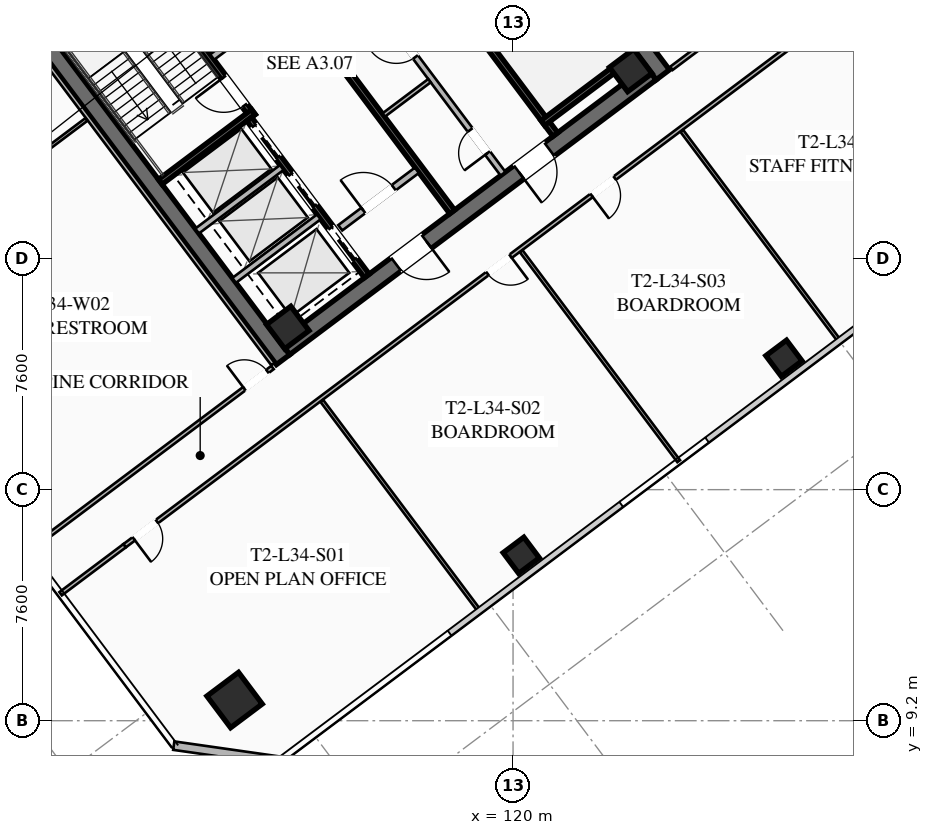
"""IFC4 building model, lengths in metres.
Left out: names, types, materials, properties, quantities, classifications, styles, units other than length and angle.
Written with IfcOpenShell. Run it as: python <this file> out.ifc"""

import sys

from ifc_helpers import new_model, si_unit, direction, frame, frame_2d, origin, origin_2d, place, context, subcontext, project, spatial, rectangle, hollow_rectangle, extrude, element, fill, save


model = new_model("IFC4")
c1 = context("Model", 3, precision=1e-05, world=origin(), true_north=direction((0.0, 1.0)))
c2 = subcontext(c1, "Body", "Model", "MODEL_VIEW")
j1 = project(units=[si_unit("LENGTHUNIT", "METRE"), si_unit("PLANEANGLEUNIT", "RADIAN")], contexts=[c1])
p1 = place(None, origin())
s1 = spatial("IfcSite", under=j1, at=p1, CompositionType="ELEMENT")
p2 = place(p1, origin())
s2 = spatial("IfcBuilding", under=s1, at=p2, CompositionType="ELEMENT")
p3 = place(p2, frame((0.0, 0.0, 128.6)))
s3 = spatial("IfcBuildingStorey", under=s2, at=p3, CompositionType="ELEMENT", Elevation=128.6)
for number, where, z_axis, x_axis in (
    (1, (112.436, 21.077, 0.0), (0.0, 0.0, 1.0), (-0.6, 0.8, 0.0)),
    (2, (115.564, 42.923, 0.0), (0.0, 0.0, 1.0), (0.6, -0.8, 0.0)),
):
    element("IfcWall", number, at=place(p3, frame(where, z_axis=z_axis, x_axis=x_axis)), inside=s3, PredefinedType="SHEAR", context=c2, shape_type="SweptSolid", body=[
        extrude(rectangle(XDim=15.6, YDim=0.55, at=frame_2d((7.8, 0.0))), origin(), (0.0, 0.0, 1.0), 3.55),
    ])
p4 = place(p3, frame((124.539, 30.498, 0.0), z_axis=(0.0, 0.0, 1.0), x_axis=(-0.799998054672, -0.600002593761, 0.0)))
e3 = element("IfcWall", 3, at=p4, inside=s3, PredefinedType="SHEAR", context=c2, shape_type="SweptSolid", body=[
    extrude(rectangle(XDim=15.06, YDim=0.55, at=frame_2d((7.53, 0.0))), origin(), (0.0, 0.0, 1.0), 3.55),
])
p5 = place(p4, frame((9.23, 0.0, 0.0)))
e4 = element("IfcOpeningElement", 4, at=p5, cuts=e3, PredefinedType="OPENING", context=c2, shape_type="SweptSolid", body=[
    extrude(rectangle(XDim=1.25, YDim=2.25, at=frame_2d((0.625, 1.125))), frame((0.0, 0.285, 0.0), z_axis=(0.0, -1.0, 0.0), x_axis=(1.0, 0.0, 0.0)), (0.0, 0.0, 1.0), 0.57),
])
p6 = place(p4, frame((4.18, 0.0, 0.0)))
e5 = element("IfcOpeningElement", 5, at=p6, cuts=e3, PredefinedType="OPENING", context=c2, shape_type="SweptSolid", body=[
    extrude(rectangle(XDim=1.25, YDim=2.25, at=frame_2d((0.625, 1.125))), frame((0.0, 0.285, 0.0), z_axis=(0.0, -1.0, 0.0), x_axis=(1.0, 0.0, 0.0)), (0.0, 0.0, 1.0), 0.57),
])
for number, where, z_axis, x_axis in (
    (6, (112.59, 22.13, 0.0), (0.0, 0.0, 1.0), (0.8, 0.6, 0.0)),
    (7, (123.87, 30.59, 0.0), (0.0, 0.0, 1.0), (0.8, 0.6, 0.0)),
):
    element("IfcColumn", number, at=place(p3, frame(where, z_axis=z_axis, x_axis=x_axis)), inside=s3, PredefinedType="COLUMN", context=c2, shape_type="SweptSolid", body=[
        extrude(hollow_rectangle(XDim=1.0, YDim=1.0, WallThickness=0.04, at=origin_2d()), origin(), (0.0, 0.0, 1.0), 3.37),
    ])
p7 = place(p3, frame((110.84, 9.88, 0.0), z_axis=(0.0, 0.0, 1.0), x_axis=(0.799999996291, 0.600000004945, 0.0)))
e8 = element("IfcColumn", 8, at=p7, inside=s3, PredefinedType="COLUMN", context=c2, shape_type="SweptSolid", body=[
    extrude(hollow_rectangle(XDim=1.3, YDim=1.3, WallThickness=0.05, at=origin_2d()), origin(), (0.0, 0.0, 1.0), 3.37),
])
for number, where, z_axis, x_axis in (
    (9, (120.27, 14.64, 0.0), (0.0, 0.0, 1.0), (0.8, 0.6, 0.0)),
    (10, (128.91, 21.12, 0.0), (0.0, 0.0, 1.0), (0.8, 0.6, 0.0)),
):
    element("IfcColumn", number, at=place(p3, frame(where, z_axis=z_axis, x_axis=x_axis)), inside=s3, PredefinedType="COLUMN", context=c2, shape_type="SweptSolid", body=[
        extrude(hollow_rectangle(XDim=0.85, YDim=0.85, WallThickness=0.035, at=origin_2d()), origin(), (0.0, 0.0, 1.0), 3.37),
    ])
p8 = place(p3, frame((112.34, 7.88, 0.0), z_axis=(0.0, 0.0, 1.0), x_axis=(-0.989949493661, 0.141421356237, 0.0)))
e11 = element("IfcWall", 11, at=p8, inside=s3, PredefinedType="SOLIDWALL", context=c2, shape_type="SweptSolid", body=[
    extrude(rectangle(XDim=3.536, YDim=0.28, at=frame_2d((1.768, 0.0))), origin(), (0.0, 0.0, 1.0), 3.37),
])
p9 = place(p3, frame((111.44, 29.08, 0.0), z_axis=(0.0, 0.0, 1.0), x_axis=(-0.59999029481, 0.8000072788, 0.0)))
e12 = element("IfcWall", 12, at=p9, inside=s3, PredefinedType="SHEAR", context=c2, shape_type="SweptSolid", body=[
    extrude(rectangle(XDim=8.05, YDim=0.2, at=frame_2d((4.025, 0.0))), origin(), (0.0, 0.0, 1.0), 3.37),
])
p10 = place(p9, frame((0.45, 0.0, 0.0)))
e13 = element("IfcOpeningElement", 13, at=p10, cuts=e12, PredefinedType="OPENING", context=c2, shape_type="SweptSolid", body=[
    extrude(rectangle(XDim=1.15, YDim=2.2, at=frame_2d((0.575, 1.1))), frame((0.0, 0.11, 0.0), z_axis=(0.0, -1.0, 0.0), x_axis=(1.0, 0.0, 0.0)), (0.0, 0.0, 1.0), 0.22),
])
p11 = place(p3, frame((108.396, 26.922, 0.0), z_axis=(0.0, 0.0, 1.0), x_axis=(0.800015298837, 0.599979601008, 0.0)))
e14 = element("IfcWall", 14, at=p11, inside=s3, PredefinedType="SHEAR", context=c2, shape_type="SweptSolid", body=[
    extrude(rectangle(XDim=3.83, YDim=0.2, at=frame_2d((1.915, 0.0))), origin(), (0.0, 0.0, 1.0), 3.37),
])
p12 = place(p3, frame((116.56, 34.92, 0.0), z_axis=(0.0, 0.0, 1.0), x_axis=(0.59999029481, -0.8000072788, 0.0)))
e15 = element("IfcWall", 15, at=p12, inside=s3, PredefinedType="SHEAR", context=c2, shape_type="SweptSolid", body=[
    extrude(rectangle(XDim=8.05, YDim=0.2, at=frame_2d((4.025, 0.0))), origin(), (0.0, 0.0, 1.0), 3.37),
])
p13 = place(p12, frame((0.45, 0.0, 0.0)))
e16 = element("IfcOpeningElement", 16, at=p13, cuts=e15, PredefinedType="OPENING", context=c2, shape_type="SweptSolid", body=[
    extrude(rectangle(XDim=1.15, YDim=2.2, at=frame_2d((0.575, 1.1))), frame((0.0, 0.11, 0.0), z_axis=(0.0, -1.0, 0.0), x_axis=(1.0, 0.0, 0.0)), (0.0, 0.0, 1.0), 0.22),
])
p14 = place(p3, frame((120.98, 28.86, 0.0), z_axis=(0.0, 0.0, 1.0), x_axis=(0.800015298837, 0.599979601008, 0.0)))
e17 = element("IfcWall", 17, at=p14, inside=s3, PredefinedType="SHEAR", context=c2, shape_type="SweptSolid", body=[
    extrude(rectangle(XDim=3.83, YDim=0.2, at=frame_2d((1.915, 0.0))), origin(), (0.0, 0.0, 1.0), 3.37),
])
p15 = place(p3, frame((117.998, 25.936, 0.0), z_axis=(0.0, 0.0, 1.0), x_axis=(-0.600002693989, 0.799997979501, 0.0)))
e18 = element("IfcWall", 18, at=p15, inside=s3, PredefinedType="SHEAR", context=c2, shape_type="SweptSolid", body=[
    extrude(rectangle(XDim=14.5, YDim=0.2, at=frame_2d((7.25, 0.0))), origin(), (0.0, 0.0, 1.0), 3.37),
])
p16 = place(p3, frame((110.104, 31.028, 0.0), z_axis=(0.0, 0.0, 1.0), x_axis=(0.800018601094, 0.59997519774, 0.0)))
e19 = element("IfcWall", 19, at=p16, inside=s3, PredefinedType="SOLIDWALL", context=c2, shape_type="SweptSolid", body=[
    extrude(rectangle(XDim=3.15, YDim=0.22, at=frame_2d((1.575, 0.0))), origin(), (0.0, 0.0, 1.0), 2.723),
])
p17 = place(p16, frame((1.1, 0.0, 0.0)))
e20 = element("IfcOpeningElement", 20, at=p17, cuts=e19, PredefinedType="OPENING", context=c2, shape_type="SweptSolid", body=[
    extrude(rectangle(XDim=0.95, YDim=2.05, at=frame_2d((0.475, 1.025))), frame((0.0, 0.12, 0.0), z_axis=(0.0, -1.0, 0.0), x_axis=(1.0, 0.0, 0.0)), (0.0, 0.0, 1.0), 0.24),
])
p18 = place(p3, frame((114.316, 25.412, 0.0), z_axis=(0.0, 0.0, 1.0), x_axis=(0.800018601094, 0.59997519774, 0.0)))
e21 = element("IfcWall", 21, at=p18, inside=s3, PredefinedType="SOLIDWALL", context=c2, shape_type="SweptSolid", body=[
    extrude(rectangle(XDim=3.15, YDim=0.22, at=frame_2d((1.575, 0.0))), origin(), (0.0, 0.0, 1.0), 2.723),
])
p19 = place(p18, frame((0.95, 0.0, 0.0)))
e22 = element("IfcOpeningElement", 22, at=p19, cuts=e21, PredefinedType="OPENING", context=c2, shape_type="SweptSolid", body=[
    extrude(rectangle(XDim=1.25, YDim=2.25, at=frame_2d((0.625, 1.125))), frame((0.0, 0.12, 0.0), z_axis=(0.0, -1.0, 0.0), x_axis=(1.0, 0.0, 0.0)), (0.0, 0.0, 1.0), 0.24),
])
p20 = place(p3, frame((115.19, 23.83, 0.0), z_axis=(0.0, 0.0, 1.0), x_axis=(-0.599993943644, 0.800004542231, 0.0)))
e23 = element("IfcWall", 23, at=p20, inside=s3, PredefinedType="SHEAR", context=c2, shape_type="SweptSolid", body=[
    extrude(rectangle(XDim=6.45, YDim=0.2, at=frame_2d((3.225, 0.0))), origin(), (0.0, 0.0, 1.0), 3.37),
])
p21 = place(p20, frame((4.875, 0.0, 0.0)))
e24 = element("IfcOpeningElement", 24, at=p21, cuts=e23, PredefinedType="OPENING", context=c2, shape_type="SweptSolid", body=[
    extrude(rectangle(XDim=1.3, YDim=2.25, at=frame_2d((0.65, 1.125))), frame((0.0, 0.11, 0.0), z_axis=(0.0, -1.0, 0.0), x_axis=(1.0, 0.0, 0.0)), (0.0, 0.0, 1.0), 0.22),
])
p22 = place(p20, frame((2.875, 0.0, 0.0)))
e25 = element("IfcOpeningElement", 25, at=p22, cuts=e23, PredefinedType="OPENING", context=c2, shape_type="SweptSolid", body=[
    extrude(rectangle(XDim=1.3, YDim=2.25, at=frame_2d((0.65, 1.125))), frame((0.0, 0.11, 0.0), z_axis=(0.0, -1.0, 0.0), x_axis=(1.0, 0.0, 0.0)), (0.0, 0.0, 1.0), 0.22),
])
p23 = place(p20, frame((0.675, 0.0, 0.0)))
e26 = element("IfcOpeningElement", 26, at=p23, cuts=e23, PredefinedType="OPENING", context=c2, shape_type="SweptSolid", body=[
    extrude(rectangle(XDim=1.3, YDim=2.25, at=frame_2d((0.65, 1.125))), frame((0.0, 0.11, 0.0), z_axis=(0.0, -1.0, 0.0), x_axis=(1.0, 0.0, 0.0)), (0.0, 0.0, 1.0), 0.22),
])
for number, where, z_axis, x_axis in (
    (27, (110.826, 23.682, 0.0), (0.0, 0.0, 1.0), (0.8, 0.6, 0.0)),
    (28, (109.608, 25.306, 0.0), (0.0, 0.0, 1.0), (0.8, 0.6, 0.0)),
):
    element("IfcWall", number, at=place(p3, frame(where, z_axis=z_axis, x_axis=x_axis)), inside=s3, PredefinedType="SOLIDWALL", context=c2, shape_type="SweptSolid", body=[
        extrude(rectangle(XDim=3.48, YDim=0.2, at=frame_2d((1.74, 0.0))), origin(), (0.0, 0.0, 1.0), 3.37),
    ])
p24 = place(p3, frame((119.67, 27.19, 0.0), z_axis=(0.0, 0.0, 1.0), x_axis=(-0.599988677396, 0.800008491828, 0.0)))
e29 = element("IfcWall", 29, at=p24, inside=s3, PredefinedType="SOLIDWALL", context=c2, shape_type="SweptSolid", body=[
    extrude(rectangle(XDim=6.9, YDim=0.2, at=frame_2d((3.45, 0.0))), origin(), (0.0, 0.0, 1.0), 2.723),
])
p25 = place(p24, frame((0.85, 0.0, 0.0)))
e30 = element("IfcOpeningElement", 30, at=p25, cuts=e29, PredefinedType="OPENING", context=c2, shape_type="SweptSolid", body=[
    extrude(rectangle(XDim=0.95, YDim=2.05, at=frame_2d((0.475, 1.025))), frame((0.0, 0.11, 0.0), z_axis=(0.0, -1.0, 0.0), x_axis=(1.0, 0.0, 0.0)), (0.0, 0.0, 1.0), 0.22),
])
p26 = place(p24, frame((4.8, 0.0, 0.0)))
e31 = element("IfcOpeningElement", 31, at=p26, cuts=e29, PredefinedType="OPENING", context=c2, shape_type="SweptSolid", body=[
    extrude(rectangle(XDim=1.05, YDim=2.2, at=frame_2d((0.525, 1.1))), frame((0.0, 0.11, 0.0), z_axis=(0.0, -1.0, 0.0), x_axis=(1.0, 0.0, 0.0)), (0.0, 0.0, 1.0), 0.22),
])
p27 = place(p3, frame((115.746, 29.122, 0.0), z_axis=(0.0, 0.0, 1.0), x_axis=(0.8, 0.6, 0.0)))
e32 = element("IfcWall", 32, at=p27, inside=s3, PredefinedType="PARTITIONING", context=c2, shape_type="SweptSolid", body=[
    extrude(rectangle(XDim=1.88, YDim=0.135, at=frame_2d((0.94, 0.0))), origin(), (0.0, 0.0, 1.0), 2.723),
])
p28 = place(p3, frame((95.42, 30.69, 0.0), z_axis=(0.0, 0.0, 1.0), x_axis=(0.8, 0.6, 0.0)))
e33 = element("IfcWall", 33, at=p28, inside=s3, PredefinedType="PARTITIONING", context=c2, shape_type="SweptSolid", body=[
    extrude(rectangle(XDim=31.3, YDim=0.135, at=frame_2d((15.65, 0.0))), origin(), (0.0, 0.0, 1.0), 2.723),
])
p29 = place(p28, frame((0.3, 0.0, 0.0)))
e34 = element("IfcOpeningElement", 34, at=p29, cuts=e33, PredefinedType="OPENING", context=c2, shape_type="SweptSolid", body=[
    extrude(rectangle(XDim=0.95, YDim=2.05, at=frame_2d((0.475, 1.025))), frame((0.0, 0.077, 0.0), z_axis=(0.0, -1.0, 0.0), x_axis=(1.0, 0.0, 0.0)), (0.0, 0.0, 1.0), 0.155),
])
p30 = place(p28, frame((30.05, 0.0, 0.0)))
e35 = element("IfcOpeningElement", 35, at=p30, cuts=e33, PredefinedType="OPENING", context=c2, shape_type="SweptSolid", body=[
    extrude(rectangle(XDim=0.95, YDim=2.05, at=frame_2d((0.475, 1.025))), frame((0.0, 0.077, 0.0), z_axis=(0.0, -1.0, 0.0), x_axis=(1.0, 0.0, 0.0)), (0.0, 0.0, 1.0), 0.155),
])
p31 = place(p3, frame((132.262, 33.734, 0.0), z_axis=(0.0, 0.0, 1.0), x_axis=(-0.800003744006, -0.59999500796, 0.0)))
e36 = element("IfcWall", 36, at=p31, inside=s3, PredefinedType="PARTITIONING", context=c2, shape_type="SweptSolid", body=[
    extrude(rectangle(XDim=31.3, YDim=0.135, at=frame_2d((15.65, 0.0))), origin(), (0.0, 0.0, 1.0), 2.723),
])
p32 = place(p31, frame((29.97, 0.0, 0.0)))
e37 = element("IfcOpeningElement", 37, at=p32, cuts=e36, PredefinedType="OPENING", context=c2, shape_type="SweptSolid", body=[
    extrude(rectangle(XDim=0.95, YDim=2.05, at=frame_2d((0.475, 1.025))), frame((0.0, 0.077, 0.0), z_axis=(0.0, -1.0, 0.0), x_axis=(1.0, 0.0, 0.0)), (0.0, 0.0, 1.0), 0.155),
])
p33 = place(p31, frame((15.43, 0.0, 0.0)))
e38 = element("IfcOpeningElement", 38, at=p33, cuts=e36, PredefinedType="OPENING", context=c2, shape_type="SweptSolid", body=[
    extrude(rectangle(XDim=0.95, YDim=2.05, at=frame_2d((0.475, 1.025))), frame((0.0, 0.077, 0.0), z_axis=(0.0, -1.0, 0.0), x_axis=(1.0, 0.0, 0.0)), (0.0, 0.0, 1.0), 0.155),
])
p34 = place(p31, frame((11.146, 0.0, 0.0)))
e39 = element("IfcOpeningElement", 39, at=p34, cuts=e36, PredefinedType="OPENING", context=c2, shape_type="SweptSolid", body=[
    extrude(rectangle(XDim=0.95, YDim=2.05, at=frame_2d((0.475, 1.025))), frame((0.0, 0.077, 0.0), z_axis=(0.0, -1.0, 0.0), x_axis=(1.0, 0.0, 0.0)), (0.0, 0.0, 1.0), 0.155),
])
p35 = place(p31, frame((0.38, 0.0, 0.0)))
e40 = element("IfcOpeningElement", 40, at=p35, cuts=e36, PredefinedType="OPENING", context=c2, shape_type="SweptSolid", body=[
    extrude(rectangle(XDim=0.95, YDim=2.05, at=frame_2d((0.475, 1.025))), frame((0.0, 0.077, 0.0), z_axis=(0.0, -1.0, 0.0), x_axis=(1.0, 0.0, 0.0)), (0.0, 0.0, 1.0), 0.155),
])
p36 = place(p3, frame((105.118, 13.376, 0.0), z_axis=(0.0, 0.0, 1.0), x_axis=(0.799977721118, 0.600029704027, 0.0)))
e41 = element("IfcWall", 41, at=p36, inside=s3, PredefinedType="PARTITIONING", context=c2, shape_type="SweptSolid", body=[
    extrude(rectangle(XDim=2.63, YDim=0.135, at=frame_2d((1.315, 0.0))), origin(), (0.0, 0.0, 1.0), 2.723),
])
p37 = place(p3, frame((118.888, 12.816, 0.0), z_axis=(0.0, 0.0, 1.0), x_axis=(-0.599995473644, 0.800003394747, 0.0)))
e42 = element("IfcWall", 42, at=p37, inside=s3, PredefinedType="PARTITIONING", context=c2, shape_type="SweptSolid", body=[
    extrude(rectangle(XDim=8.63, YDim=0.11, at=frame_2d((4.315, 0.0))), origin(), (0.0, 0.0, 1.0), 2.723),
])
p38 = place(p3, frame((125.448, 17.736, 0.0), z_axis=(0.0, 0.0, 1.0), x_axis=(-0.600009052859, 0.799993210276, 0.0)))
e43 = element("IfcWall", 43, at=p38, inside=s3, PredefinedType="PARTITIONING", context=c2, shape_type="SweptSolid", body=[
    extrude(rectangle(XDim=8.63, YDim=0.11, at=frame_2d((4.315, 0.0))), origin(), (0.0, 0.0, 1.0), 2.723),
])
p39 = place(p3, frame((130.728, 21.696, 0.0), z_axis=(0.0, 0.0, 1.0), x_axis=(-0.599995473644, 0.800003394747, 0.0)))
e44 = element("IfcWall", 44, at=p39, inside=s3, PredefinedType="PARTITIONING", context=c2, shape_type="SweptSolid", body=[
    extrude(rectangle(XDim=8.63, YDim=0.11, at=frame_2d((4.315, 0.0))), origin(), (0.0, 0.0, 1.0), 2.723),
])
p40 = place(p3, frame((125.208, 30.656, 0.0), z_axis=(0.0, 0.0, 1.0), x_axis=(0.800005876956, 0.599992163979, 0.0)))
e45 = element("IfcWall", 45, at=p40, inside=s3, PredefinedType="PARTITIONING", context=c2, shape_type="SweptSolid", body=[
    extrude(rectangle(XDim=9.97, YDim=0.135, at=frame_2d((4.985, 0.0))), origin(), (0.0, 0.0, 1.0), 2.723),
])
p41 = place(p40, frame((2.045, 0.0, 0.0)))
e46 = element("IfcOpeningElement", 46, at=p41, cuts=e45, PredefinedType="OPENING", context=c2, shape_type="SweptSolid", body=[
    extrude(rectangle(XDim=0.95, YDim=2.05, at=frame_2d((0.475, 1.025))), frame((0.0, 0.077, 0.0), z_axis=(0.0, -1.0, 0.0), x_axis=(1.0, 0.0, 0.0)), (0.0, 0.0, 1.0), 0.155),
])
p42 = place(p3, frame((112.104, 20.928, 0.0), z_axis=(0.0, 0.0, 1.0), x_axis=(-0.599994940075, 0.800003794918, 0.0)))
e47 = element("IfcWall", 47, at=p42, inside=s3, PredefinedType="PARTITIONING", context=c2, shape_type="SweptSolid", body=[
    extrude(rectangle(XDim=15.44, YDim=0.135, at=frame_2d((7.72, 0.0))), origin(), (0.0, 0.0, 1.0), 2.723),
])
p43 = place(p3, frame((104.056, 14.792, 0.0), z_axis=(0.0, 0.0, 1.0), x_axis=(0.800002918023, 0.599996109283, 0.0)))
e48 = element("IfcWall", 48, at=p43, inside=s3, PredefinedType="PARTITIONING", context=c2, shape_type="SweptSolid", body=[
    extrude(rectangle(XDim=10.04, YDim=0.135, at=frame_2d((5.02, 0.0))), origin(), (0.0, 0.0, 1.0), 2.723),
])
p44 = place(p43, frame((8.88, 0.0, 0.0)))
e49 = element("IfcOpeningElement", 49, at=p44, cuts=e48, PredefinedType="OPENING", context=c2, shape_type="SweptSolid", body=[
    extrude(rectangle(XDim=0.95, YDim=2.05, at=frame_2d((0.475, 1.025))), frame((0.0, 0.077, 0.0), z_axis=(0.0, -1.0, 0.0), x_axis=(1.0, 0.0, 0.0)), (0.0, 0.0, 1.0), 0.155),
])
p45 = place(p3, frame((97.936, 22.952, 0.0), z_axis=(0.0, 0.0, 1.0), x_axis=(0.799991245945, 0.600011671896, 0.0)))
e50 = element("IfcWall", 50, at=p45, inside=s3, PredefinedType="PARTITIONING", context=c2, shape_type="SweptSolid", body=[
    extrude(rectangle(XDim=10.04, YDim=0.11, at=frame_2d((5.02, 0.0))), origin(), (0.0, 0.0, 1.0), 2.723),
])
p46 = place(p5, origin())
e51 = element("IfcDoor", 51, at=p46, inside=s3, OperationType="SINGLE_SWING_LEFT", PredefinedType="DOOR", context=c2, shape_type="SweptSolid", body=[
    extrude(rectangle(XDim=1.25, YDim=2.25, at=frame_2d((0.625, 1.125))), frame((0.0, 0.025, 0.0), z_axis=(0.0, -1.0, 0.0), x_axis=(1.0, 0.0, 0.0)), (0.0, 0.0, 1.0), 0.05),
])
fill(e4, e51)
p47 = place(p6, origin())
e52 = element("IfcDoor", 52, at=p47, inside=s3, OperationType="SINGLE_SWING_RIGHT", PredefinedType="DOOR", context=c2, shape_type="SweptSolid", body=[
    extrude(rectangle(XDim=1.25, YDim=2.25, at=frame_2d((0.625, 1.125))), frame((0.0, 0.025, 0.0), z_axis=(0.0, -1.0, 0.0), x_axis=(1.0, 0.0, 0.0)), (0.0, 0.0, 1.0), 0.05),
])
fill(e5, e52)
p48 = place(p10, origin())
e53 = element("IfcDoor", 53, at=p48, inside=s3, OperationType="SINGLE_SWING_RIGHT", PredefinedType="DOOR", context=c2, shape_type="SweptSolid", body=[
    extrude(rectangle(XDim=1.15, YDim=2.2, at=frame_2d((0.575, 1.1))), frame((0.0, 0.025, 0.0), z_axis=(0.0, -1.0, 0.0), x_axis=(1.0, 0.0, 0.0)), (0.0, 0.0, 1.0), 0.05),
])
fill(e13, e53)
p49 = place(p19, origin())
e54 = element("IfcDoor", 54, at=p49, inside=s3, OperationType="SINGLE_SWING_LEFT", PredefinedType="DOOR", context=c2, shape_type="SweptSolid", body=[
    extrude(rectangle(XDim=1.25, YDim=2.25, at=frame_2d((0.625, 1.125))), frame((0.0, 0.025, 0.0), z_axis=(0.0, -1.0, 0.0), x_axis=(1.0, 0.0, 0.0)), (0.0, 0.0, 1.0), 0.05),
])
fill(e22, e54)
p50 = place(p25, origin())
e55 = element("IfcDoor", 55, at=p50, inside=s3, OperationType="SINGLE_SWING_LEFT", PredefinedType="DOOR", context=c2, shape_type="SweptSolid", body=[
    extrude(rectangle(XDim=0.95, YDim=2.05, at=frame_2d((0.475, 1.025))), frame((0.0, 0.025, 0.0), z_axis=(0.0, -1.0, 0.0), x_axis=(1.0, 0.0, 0.0)), (0.0, 0.0, 1.0), 0.05),
])
fill(e30, e55)
p51 = place(p26, origin())
e56 = element("IfcDoor", 56, at=p51, inside=s3, OperationType="SINGLE_SWING_RIGHT", PredefinedType="DOOR", context=c2, shape_type="SweptSolid", body=[
    extrude(rectangle(XDim=1.05, YDim=2.2, at=frame_2d((0.525, 1.1))), frame((0.0, 0.025, 0.0), z_axis=(0.0, -1.0, 0.0), x_axis=(1.0, 0.0, 0.0)), (0.0, 0.0, 1.0), 0.05),
])
fill(e31, e56)
p52 = place(p32, origin())
e57 = element("IfcDoor", 57, at=p52, inside=s3, OperationType="SINGLE_SWING_RIGHT", PredefinedType="DOOR", context=c2, shape_type="SweptSolid", body=[
    extrude(rectangle(XDim=0.95, YDim=2.05, at=frame_2d((0.475, 1.025))), frame((0.0, 0.025, 0.0), z_axis=(0.0, -1.0, 0.0), x_axis=(1.0, 0.0, 0.0)), (0.0, 0.0, 1.0), 0.05),
])
fill(e37, e57)
p53 = place(p33, origin())
e58 = element("IfcDoor", 58, at=p53, inside=s3, OperationType="SINGLE_SWING_LEFT", PredefinedType="DOOR", context=c2, shape_type="SweptSolid", body=[
    extrude(rectangle(XDim=0.95, YDim=2.05, at=frame_2d((0.475, 1.025))), frame((0.0, 0.025, 0.0), z_axis=(0.0, -1.0, 0.0), x_axis=(1.0, 0.0, 0.0)), (0.0, 0.0, 1.0), 0.05),
])
fill(e38, e58)
p54 = place(p34, origin())
e59 = element("IfcDoor", 59, at=p54, inside=s3, OperationType="SINGLE_SWING_RIGHT", PredefinedType="DOOR", context=c2, shape_type="SweptSolid", body=[
    extrude(rectangle(XDim=0.95, YDim=2.05, at=frame_2d((0.475, 1.025))), frame((0.0, 0.025, 0.0), z_axis=(0.0, -1.0, 0.0), x_axis=(1.0, 0.0, 0.0)), (0.0, 0.0, 1.0), 0.05),
])
fill(e39, e59)
p55 = place(p44, origin())
e60 = element("IfcDoor", 60, at=p55, inside=s3, OperationType="SINGLE_SWING_LEFT", PredefinedType="DOOR", context=c2, shape_type="SweptSolid", body=[
    extrude(rectangle(XDim=0.95, YDim=2.05, at=frame_2d((0.475, 1.025))), frame((0.0, 0.025, 0.0), z_axis=(0.0, -1.0, 0.0), x_axis=(1.0, 0.0, 0.0)), (0.0, 0.0, 1.0), 0.05),
])
fill(e49, e60)
p56 = place(p21, origin())
e61 = element("IfcDoor", 61, at=p56, inside=s3, OperationType="SLIDING_TO_LEFT", PredefinedType="DOOR", context=c2, shape_type="SweptSolid", body=[
    extrude(rectangle(XDim=1.3, YDim=2.25, at=frame_2d((0.65, 1.125))), frame((0.0, 0.025, 0.0), z_axis=(0.0, -1.0, 0.0), x_axis=(1.0, 0.0, 0.0)), (0.0, 0.0, 1.0), 0.05),
])
fill(e24, e61)
p57 = place(p22, origin())
e62 = element("IfcDoor", 62, at=p57, inside=s3, OperationType="SLIDING_TO_LEFT", PredefinedType="DOOR", context=c2, shape_type="SweptSolid", body=[
    extrude(rectangle(XDim=1.3, YDim=2.25, at=frame_2d((0.65, 1.125))), frame((0.0, 0.025, 0.0), z_axis=(0.0, -1.0, 0.0), x_axis=(1.0, 0.0, 0.0)), (0.0, 0.0, 1.0), 0.05),
])
fill(e25, e62)
p58 = place(p23, origin())
e63 = element("IfcDoor", 63, at=p58, inside=s3, OperationType="SLIDING_TO_LEFT", PredefinedType="DOOR", context=c2, shape_type="SweptSolid", body=[
    extrude(rectangle(XDim=1.3, YDim=2.25, at=frame_2d((0.65, 1.125))), frame((0.0, 0.025, 0.0), z_axis=(0.0, -1.0, 0.0), x_axis=(1.0, 0.0, 0.0)), (0.0, 0.0, 1.0), 0.05),
])
fill(e26, e63)
save(model, sys.argv[1])
